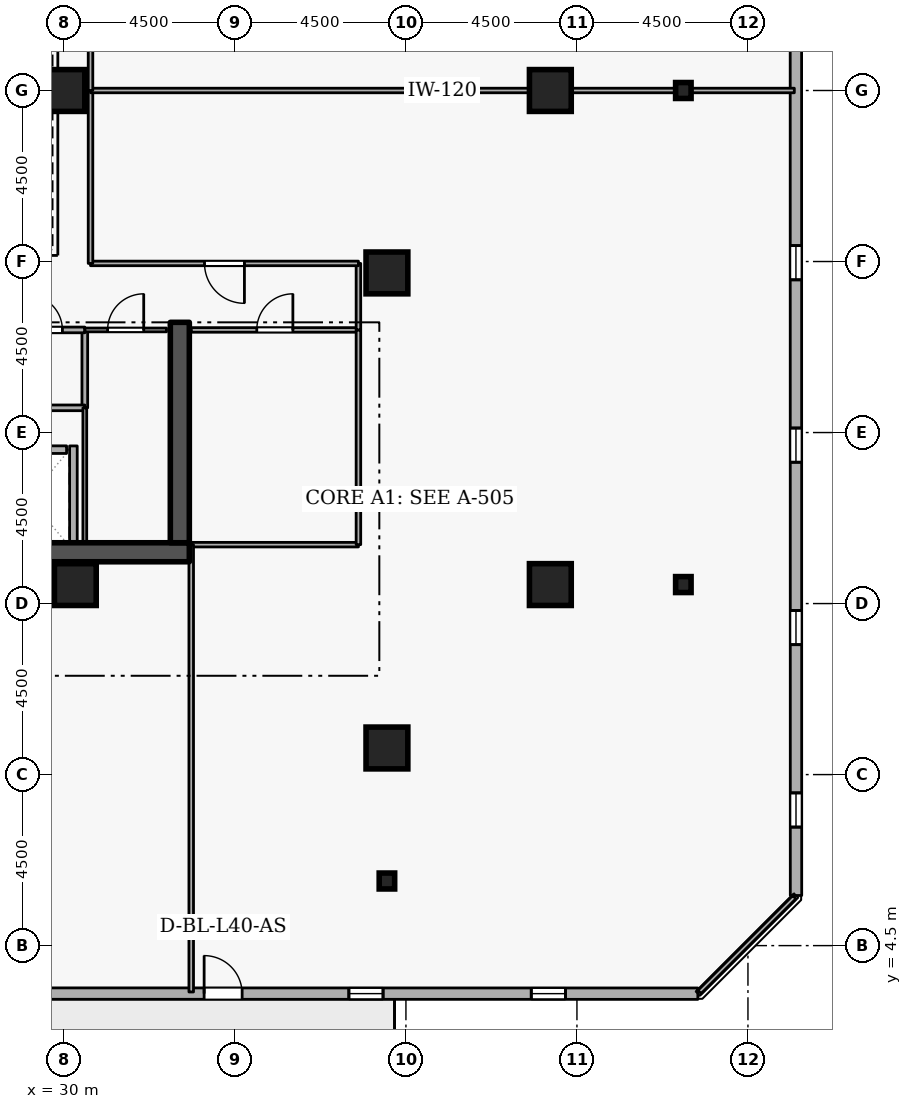
"""IFC4 building model, lengths in metres.
Left out: names, types, materials, properties, quantities, classifications, styles, units other than length and angle.
Written with IfcOpenShell. Run it as: python <this file> out.ifc"""

import sys

from ifc_helpers import new_model, si_unit, direction, frame, frame_2d, origin, origin_2d, place, context, subcontext, project, spatial, rectangle, i_section, extrude, element, fill, save


model = new_model("IFC4")
c1 = context("Model", 3, precision=1e-05, world=origin(), true_north=direction((0.0, 1.0)))
c2 = subcontext(c1, "Body", "Model", "MODEL_VIEW")
j1 = project(units=[si_unit("LENGTHUNIT", "METRE"), si_unit("PLANEANGLEUNIT", "RADIAN")], contexts=[c1])
p1 = place(None, origin())
s1 = spatial("IfcSite", under=j1, at=p1, CompositionType="ELEMENT")
p2 = place(p1, origin())
s2 = spatial("IfcBuilding", under=s1, at=p2, CompositionType="ELEMENT")
p3 = place(p2, frame((0.0, 0.0, 152.7)))
s3 = spatial("IfcBuildingStorey", under=s2, at=p3, CompositionType="ELEMENT", Elevation=152.7)
p4 = place(p3, frame((17.7, 14.85, 0.0), z_axis=(0.0, 0.0, 1.0), x_axis=(1.0, 0.0, 0.0)))
e1 = element("IfcWall", 1, at=p4, inside=s3, PredefinedType="SHEAR", context=c2, shape_type="SweptSolid", body=[
    extrude(rectangle(XDim=15.6, YDim=0.5, at=frame_2d((7.8, 0.0))), origin(), (0.0, 0.0, 1.0), 3.6),
])
p5 = place(p3, frame((33.05, 15.1, 0.0), z_axis=(0.0, 0.0, 1.0), x_axis=(0.0, 1.0, 0.0)))
e2 = element("IfcWall", 2, at=p5, inside=s3, PredefinedType="SHEAR", context=c2, shape_type="SweptSolid", body=[
    extrude(rectangle(XDim=5.8, YDim=0.5, at=frame_2d((2.9, 0.0))), origin(), (0.0, 0.0, 1.0), 3.6),
])
for number, where, z_axis, x_axis in (
    (3, (38.5, 9.7, 0.0), (0.0, 0.0, 1.0), (1.0, 0.0, 0.0)),
    (4, (42.8, 14.0, 0.0), (0.0, 0.0, 1.0), (1.0, 0.0, 0.0)),
    (5, (42.8, 27.0, 0.0), (0.0, 0.0, 1.0), (1.0, 0.0, 0.0)),
    (6, (38.5, 22.2, 0.0), (0.0, 0.0, 1.0), (1.0, 0.0, 0.0)),
    (7, (30.3, 14.0, 0.0), (0.0, 0.0, 1.0), (1.0, 0.0, 0.0)),
    (8, (30.0, 27.0, 0.0), (0.0, 0.0, 1.0), (1.0, 0.0, 0.0)),
):
    element("IfcColumn", number, at=place(p3, frame(where, z_axis=z_axis, x_axis=x_axis)), inside=s3, PredefinedType="COLUMN", context=c2, shape_type="SweptSolid", body=[
        extrude(rectangle(XDim=1.1, YDim=1.1, at=origin_2d()), origin(), (0.0, 0.0, 1.0), 3.6),
    ])
for number, where, z_axis, x_axis in (
    (9, (38.5, 6.2, 0.0), (0.0, 0.0, 1.0), (1.0, 0.0, 0.0)),
    (10, (46.3, 14.0, 0.0), (0.0, 0.0, 1.0), (1.0, 0.0, 0.0)),
    (11, (46.3, 27.0, 0.0), (0.0, 0.0, 1.0), (1.0, 0.0, 0.0)),
):
    element("IfcColumn", number, at=place(p3, frame(where, z_axis=z_axis, x_axis=x_axis)), inside=s3, PredefinedType="COLUMN", context=c2, shape_type="SweptSolid", body=[
        extrude(i_section(OverallWidth=0.407, OverallDepth=0.419, WebThickness=0.031, FlangeThickness=0.049, FilletRadius=0.015, at=origin_2d()), origin(), (0.0, 0.0, 1.0), 3.6),
    ])
p6 = place(p3, frame((11.698, 3.24, 0.0), z_axis=(0.0, 0.0, 1.0), x_axis=(0.999999991209, -0.000132597301, 0.0)))
e12 = element("IfcWall", 12, at=p6, inside=s3, PredefinedType="STANDARD", context=c2, shape_type="SweptSolid", body=[
    extrude(rectangle(XDim=34.983, YDim=0.3, at=frame_2d((17.492, 0.0))), origin(), (0.0, 0.0, 1.0), 2.7),
])
p7 = place(p6, frame((21.992, 0.0, 0.0)))
e13 = element("IfcOpeningElement", 13, at=p7, cuts=e12, PredefinedType="OPENING", context=c2, shape_type="SweptSolid", body=[
    extrude(rectangle(XDim=1.0, YDim=2.08, at=frame_2d((0.5, 1.04))), frame((0.0, 0.16, 0.0), z_axis=(0.0, -1.0, 0.0), x_axis=(1.0, 0.0, 0.0)), (0.0, 0.0, 1.0), 0.32),
])
p8 = place(p6, frame((1.8, 0.0, 0.72)))
e14 = element("IfcOpeningElement", 14, at=p8, cuts=e12, PredefinedType="OPENING", context=c2, shape_type="SweptSolid", body=[
    extrude(rectangle(XDim=0.9, YDim=1.75, at=frame_2d((0.45, 0.875))), frame((0.0, 0.16, 0.0), z_axis=(0.0, -1.0, 0.0), x_axis=(1.0, 0.0, 0.0)), (0.0, 0.0, 1.0), 0.32),
])
p9 = place(p6, frame((6.6, 0.0, 0.72)))
e15 = element("IfcOpeningElement", 15, at=p9, cuts=e12, PredefinedType="OPENING", context=c2, shape_type="SweptSolid", body=[
    extrude(rectangle(XDim=0.9, YDim=1.75, at=frame_2d((0.45, 0.875))), frame((0.0, 0.16, 0.0), z_axis=(0.0, -1.0, 0.0), x_axis=(1.0, 0.0, 0.0)), (0.0, 0.0, 1.0), 0.32),
])
p10 = place(p6, frame((11.4, 0.0, 0.72)))
e16 = element("IfcOpeningElement", 16, at=p10, cuts=e12, PredefinedType="OPENING", context=c2, shape_type="SweptSolid", body=[
    extrude(rectangle(XDim=0.9, YDim=1.75, at=frame_2d((0.45, 0.875))), frame((0.0, 0.16, 0.0), z_axis=(0.0, -1.0, 0.0), x_axis=(1.0, 0.0, 0.0)), (0.0, 0.0, 1.0), 0.32),
])
p11 = place(p6, frame((16.2, 0.0, 0.72)))
e17 = element("IfcOpeningElement", 17, at=p11, cuts=e12, PredefinedType="OPENING", context=c2, shape_type="SweptSolid", body=[
    extrude(rectangle(XDim=0.9, YDim=1.75, at=frame_2d((0.45, 0.875))), frame((0.0, 0.16, 0.0), z_axis=(0.0, -1.0, 0.0), x_axis=(1.0, 0.0, 0.0)), (0.0, 0.0, 1.0), 0.32),
])
p12 = place(p6, frame((25.8, 0.0, 0.72)))
e18 = element("IfcOpeningElement", 18, at=p12, cuts=e12, PredefinedType="OPENING", context=c2, shape_type="SweptSolid", body=[
    extrude(rectangle(XDim=0.9, YDim=1.75, at=frame_2d((0.45, 0.875))), frame((0.0, 0.16, 0.0), z_axis=(0.0, -1.0, 0.0), x_axis=(1.0, 0.0, 0.0)), (0.0, 0.0, 1.0), 0.32),
])
p13 = place(p6, frame((30.6, 0.0, 0.72)))
e19 = element("IfcOpeningElement", 19, at=p13, cuts=e12, PredefinedType="OPENING", context=c2, shape_type="SweptSolid", body=[
    extrude(rectangle(XDim=0.9, YDim=1.75, at=frame_2d((0.45, 0.875))), frame((0.0, 0.16, 0.0), z_axis=(0.0, -1.0, 0.0), x_axis=(1.0, 0.0, 0.0)), (0.0, 0.0, 1.0), 0.32),
])
p14 = place(p3, frame((49.265, 5.819, 0.0), z_axis=(0.0, 0.0, 1.0), x_axis=(-0.000132597301, 0.999999991209, 0.0)))
e20 = element("IfcWall", 20, at=p14, inside=s3, PredefinedType="STANDARD", context=c2, shape_type="SweptSolid", body=[
    extrude(rectangle(XDim=34.983, YDim=0.3, at=frame_2d((17.492, 0.0))), origin(), (0.0, 0.0, 1.0), 2.7),
])
p15 = place(p14, frame((1.8, 0.0, 0.72)))
e21 = element("IfcOpeningElement", 21, at=p15, cuts=e20, PredefinedType="OPENING", context=c2, shape_type="SweptSolid", body=[
    extrude(rectangle(XDim=0.9, YDim=1.75, at=frame_2d((0.45, 0.875))), frame((0.0, 0.16, 0.0), z_axis=(0.0, -1.0, 0.0), x_axis=(1.0, 0.0, 0.0)), (0.0, 0.0, 1.0), 0.32),
])
p16 = place(p14, frame((6.6, 0.0, 0.72)))
e22 = element("IfcOpeningElement", 22, at=p16, cuts=e20, PredefinedType="OPENING", context=c2, shape_type="SweptSolid", body=[
    extrude(rectangle(XDim=0.9, YDim=1.75, at=frame_2d((0.45, 0.875))), frame((0.0, 0.16, 0.0), z_axis=(0.0, -1.0, 0.0), x_axis=(1.0, 0.0, 0.0)), (0.0, 0.0, 1.0), 0.32),
])
p17 = place(p14, frame((11.4, 0.0, 0.72)))
e23 = element("IfcOpeningElement", 23, at=p17, cuts=e20, PredefinedType="OPENING", context=c2, shape_type="SweptSolid", body=[
    extrude(rectangle(XDim=0.9, YDim=1.75, at=frame_2d((0.45, 0.875))), frame((0.0, 0.16, 0.0), z_axis=(0.0, -1.0, 0.0), x_axis=(1.0, 0.0, 0.0)), (0.0, 0.0, 1.0), 0.32),
])
p18 = place(p14, frame((16.2, 0.0, 0.72)))
e24 = element("IfcOpeningElement", 24, at=p18, cuts=e20, PredefinedType="OPENING", context=c2, shape_type="SweptSolid", body=[
    extrude(rectangle(XDim=0.9, YDim=1.75, at=frame_2d((0.45, 0.875))), frame((0.0, 0.16, 0.0), z_axis=(0.0, -1.0, 0.0), x_axis=(1.0, 0.0, 0.0)), (0.0, 0.0, 1.0), 0.32),
])
p19 = place(p14, frame((25.8, 0.0, 0.72)))
e25 = element("IfcOpeningElement", 25, at=p19, cuts=e20, PredefinedType="OPENING", context=c2, shape_type="SweptSolid", body=[
    extrude(rectangle(XDim=0.9, YDim=1.75, at=frame_2d((0.45, 0.875))), frame((0.0, 0.16, 0.0), z_axis=(0.0, -1.0, 0.0), x_axis=(1.0, 0.0, 0.0)), (0.0, 0.0, 1.0), 0.32),
])
p20 = place(p14, frame((30.6, 0.0, 0.72)))
e26 = element("IfcOpeningElement", 26, at=p20, cuts=e20, PredefinedType="OPENING", context=c2, shape_type="SweptSolid", body=[
    extrude(rectangle(XDim=0.9, YDim=1.75, at=frame_2d((0.45, 0.875))), frame((0.0, 0.16, 0.0), z_axis=(0.0, -1.0, 0.0), x_axis=(1.0, 0.0, 0.0)), (0.0, 0.0, 1.0), 0.32),
])
p21 = place(p3, frame((28.08, 17.55, 0.0), z_axis=(0.0, 0.0, 1.0), x_axis=(1.0, 0.0, 0.0)))
e27 = element("IfcWall", 27, at=p21, inside=s3, PredefinedType="STANDARD", context=c2, shape_type="SweptSolid", body=[
    extrude(rectangle(XDim=1.99, YDim=0.2, at=frame_2d((0.995, 0.0))), origin(), (0.0, 0.0, 1.0), 3.34),
])
p22 = place(p3, frame((30.25, 15.112, 0.0), z_axis=(0.0, 0.0, 1.0), x_axis=(0.0, 1.0, 0.0)))
e28 = element("IfcWall", 28, at=p22, inside=s3, PredefinedType="STANDARD", context=c2, shape_type="SweptSolid", body=[
    extrude(rectangle(XDim=2.536, YDim=0.2, at=frame_2d((1.268, 0.0))), origin(), (0.0, 0.0, 1.0), 3.34),
])
p23 = place(p3, frame((30.55, 20.7, 0.0), z_axis=(0.0, 0.0, 1.0), x_axis=(0.0, -1.0, 0.0)))
e29 = element("IfcWall", 29, at=p23, inside=s3, PredefinedType="PARTITIONING", context=c2, shape_type="SweptSolid", body=[
    extrude(rectangle(XDim=2.05, YDim=0.15, at=frame_2d((1.025, 0.0))), origin(), (0.0, 0.0, 1.0), 3.34),
])
p24 = place(p3, frame((30.55, 18.65, 0.0), z_axis=(0.0, 0.0, 1.0), x_axis=(-1.0, 0.0, 0.0)))
e30 = element("IfcWall", 30, at=p24, inside=s3, PredefinedType="PARTITIONING", context=c2, shape_type="SweptSolid", body=[
    extrude(rectangle(XDim=2.1, YDim=0.15, at=frame_2d((1.05, 0.0))), origin(), (0.0, 0.0, 1.0), 3.34),
])
p25 = place(p3, frame((28.45, 20.7, 0.0), z_axis=(0.0, 0.0, 1.0), x_axis=(1.0, 0.0, 0.0)))
e31 = element("IfcWall", 31, at=p25, inside=s3, PredefinedType="PARTITIONING", context=c2, shape_type="SweptSolid", body=[
    extrude(rectangle(XDim=2.1, YDim=0.15, at=frame_2d((1.05, 0.0))), origin(), (0.0, 0.0, 1.0), 3.34),
])
p26 = place(p25, frame((0.59, 0.0, 0.0)))
e32 = element("IfcOpeningElement", 32, at=p26, cuts=e31, PredefinedType="OPENING", context=c2, shape_type="SweptSolid", body=[
    extrude(rectangle(XDim=0.92, YDim=2.08, at=frame_2d((0.46, 1.04))), frame((0.0, 0.085, 0.0), z_axis=(0.0, -1.0, 0.0), x_axis=(1.0, 0.0, 0.0)), (0.0, 0.0, 1.0), 0.17),
])
p27 = place(p3, frame((30.55, 15.1, 0.0), z_axis=(0.0, 0.0, 1.0), x_axis=(0.0, 1.0, 0.0)))
e33 = element("IfcWall", 33, at=p27, inside=s3, PredefinedType="PARTITIONING", context=c2, shape_type="SweptSolid", body=[
    extrude(rectangle(XDim=3.55, YDim=0.1, at=frame_2d((1.775, 0.0))), origin(), (0.0, 0.0, 1.0), 3.34),
])
p28 = place(p3, frame((30.55, 20.7, 0.0), z_axis=(0.0, 0.0, 1.0), x_axis=(1.0, 0.0, 0.0)))
e34 = element("IfcWall", 34, at=p28, inside=s3, PredefinedType="PARTITIONING", context=c2, shape_type="SweptSolid", body=[
    extrude(rectangle(XDim=2.15, YDim=0.1, at=frame_2d((1.075, 0.0))), origin(), (0.0, 0.0, 1.0), 3.34),
])
p29 = place(p28, frame((0.6, 0.0, 0.0)))
e35 = element("IfcOpeningElement", 35, at=p29, cuts=e34, PredefinedType="OPENING", context=c2, shape_type="SweptSolid", body=[
    extrude(rectangle(XDim=0.95, YDim=2.1, at=frame_2d((0.475, 1.05))), frame((0.0, 0.06, 0.0), z_axis=(0.0, -1.0, 0.0), x_axis=(1.0, 0.0, 0.0)), (0.0, 0.0, 1.0), 0.12),
])
p30 = place(p3, frame((37.75, 15.05, 0.0), z_axis=(0.0, 0.0, 1.0), x_axis=(-1.0, 0.0, 0.0)))
e36 = element("IfcWall", 36, at=p30, inside=s3, PredefinedType="PARTITIONING", context=c2, shape_type="SweptSolid", body=[
    extrude(rectangle(XDim=4.4, YDim=0.12, at=frame_2d((2.2, 0.0))), origin(), (0.0, 0.0, 1.0), 3.34),
])
p31 = place(p3, frame((33.35, 20.7, 0.0), z_axis=(0.0, 0.0, 1.0), x_axis=(1.0, 0.0, 0.0)))
e37 = element("IfcWall", 37, at=p31, inside=s3, PredefinedType="PARTITIONING", context=c2, shape_type="SweptSolid", body=[
    extrude(rectangle(XDim=4.4, YDim=0.12, at=frame_2d((2.2, 0.0))), origin(), (0.0, 0.0, 1.0), 3.34),
])
p32 = place(p31, frame((1.725, 0.0, 0.0)))
e38 = element("IfcOpeningElement", 38, at=p32, cuts=e37, PredefinedType="OPENING", context=c2, shape_type="SweptSolid", body=[
    extrude(rectangle(XDim=0.95, YDim=2.1, at=frame_2d((0.475, 1.05))), frame((0.0, 0.07, 0.0), z_axis=(0.0, -1.0, 0.0), x_axis=(1.0, 0.0, 0.0)), (0.0, 0.0, 1.0), 0.14),
])
p33 = place(p3, frame((37.75, 20.7, 0.0), z_axis=(0.0, 0.0, 1.0), x_axis=(0.0, -1.0, 0.0)))
e39 = element("IfcWall", 39, at=p33, inside=s3, PredefinedType="PARTITIONING", context=c2, shape_type="SweptSolid", body=[
    extrude(rectangle(XDim=5.65, YDim=0.12, at=frame_2d((2.825, 0.0))), origin(), (0.0, 0.0, 1.0), 3.34),
])
p34 = place(p3, frame((33.35, 3.28, 0.0), z_axis=(0.0, 0.0, 1.0), x_axis=(0.0, 1.0, 0.0)))
e40 = element("IfcWall", 40, at=p34, inside=s3, PredefinedType="PARTITIONING", context=c2, shape_type="SweptSolid", body=[
    extrude(rectangle(XDim=11.77, YDim=0.12, at=frame_2d((5.885, 0.0))), origin(), (0.0, 0.0, 1.0), 2.545),
])
p35 = place(p3, frame((37.75, 20.7, 0.0), z_axis=(0.0, 0.0, 1.0), x_axis=(0.0, 1.0, 0.0)))
e41 = element("IfcWall", 41, at=p35, inside=s3, PredefinedType="PARTITIONING", context=c2, shape_type="SweptSolid", body=[
    extrude(rectangle(XDim=1.75, YDim=0.12, at=frame_2d((0.875, 0.0))), origin(), (0.0, 0.0, 1.0), 3.34),
])
p36 = place(p3, frame((37.75, 22.45, 0.0), z_axis=(0.0, 0.0, 1.0), x_axis=(-1.0, 0.0, 0.0)))
e42 = element("IfcWall", 42, at=p36, inside=s3, PredefinedType="PARTITIONING", context=c2, shape_type="SweptSolid", body=[
    extrude(rectangle(XDim=7.05, YDim=0.12, at=frame_2d((3.525, 0.0))), origin(), (0.0, 0.0, 1.0), 3.34),
])
p37 = place(p36, frame((3.0, 0.0, 0.0)))
e43 = element("IfcOpeningElement", 43, at=p37, cuts=e42, PredefinedType="OPENING", context=c2, shape_type="SweptSolid", body=[
    extrude(rectangle(XDim=1.05, YDim=2.1, at=frame_2d((0.525, 1.05))), frame((0.0, 0.07, 0.0), z_axis=(0.0, -1.0, 0.0), x_axis=(1.0, 0.0, 0.0)), (0.0, 0.0, 1.0), 0.14),
])
p38 = place(p3, frame((30.7, 22.45, 0.0), z_axis=(0.0, 0.0, 1.0), x_axis=(0.0, 1.0, 0.0)))
e44 = element("IfcWall", 44, at=p38, inside=s3, PredefinedType="PARTITIONING", context=c2, shape_type="SweptSolid", body=[
    extrude(rectangle(XDim=4.55, YDim=0.12, at=frame_2d((2.275, 0.0))), origin(), (0.0, 0.0, 1.0), 3.34),
])
p39 = place(p3, frame((30.7, 27.0, 0.0), z_axis=(0.0, 0.0, 1.0), x_axis=(1.0, 0.0, 0.0)))
e45 = element("IfcWall", 45, at=p39, inside=s3, PredefinedType="PARTITIONING", context=c2, shape_type="SweptSolid", body=[
    extrude(rectangle(XDim=18.52, YDim=0.12, at=frame_2d((9.26, 0.0))), origin(), (0.0, 0.0, 1.0), 2.932),
])
p40 = place(p3, frame((49.22, 5.775, 0.0), z_axis=(0.0, 0.0, 1.0), x_axis=(-0.707106781187, -0.707106781187, 0.0)))
e46 = element("IfcWall", 46, at=p40, inside=s3, PredefinedType="PARTITIONING", context=c2, shape_type="SweptSolid", body=[
    extrude(rectangle(XDim=3.528, YDim=0.12, at=frame_2d((1.764, 0.0))), origin(), (0.0, 0.0, 1.0), 3.34),
])
p41 = place(p3, frame((30.7, 27.0, 0.0), z_axis=(0.0, 0.0, 1.0), x_axis=(0.0, 1.0, 0.0)))
e47 = element("IfcWall", 47, at=p41, inside=s3, PredefinedType="PARTITIONING", context=c2, shape_type="SweptSolid", body=[
    extrude(rectangle(XDim=4.55, YDim=0.12, at=frame_2d((2.275, 0.0))), origin(), (0.0, 0.0, 1.0), 3.34),
])
p42 = place(p7, origin())
e48 = element("IfcDoor", 48, at=p42, inside=s3, OperationType="SINGLE_SWING_LEFT", PredefinedType="DOOR", context=c2, shape_type="SweptSolid", body=[
    extrude(rectangle(XDim=1.0, YDim=2.08, at=frame_2d((0.5, 1.04))), frame((0.0, 0.025, 0.0), z_axis=(0.0, -1.0, 0.0), x_axis=(1.0, 0.0, 0.0)), (0.0, 0.0, 1.0), 0.05),
])
fill(e13, e48)
p43 = place(p12, origin())
e49 = element("IfcWindow", 49, at=p43, inside=s3, PartitioningType="SINGLE_PANEL", PredefinedType="WINDOW", context=c2, shape_type="SweptSolid", body=[
    extrude(rectangle(XDim=0.9, YDim=1.75, at=frame_2d((0.45, 0.875))), frame((0.0, 0.03, 0.0), z_axis=(0.0, -1.0, 0.0), x_axis=(1.0, 0.0, 0.0)), (0.0, 0.0, 1.0), 0.06),
])
fill(e18, e49)
p44 = place(p13, origin())
e50 = element("IfcWindow", 50, at=p44, inside=s3, PartitioningType="SINGLE_PANEL", PredefinedType="WINDOW", context=c2, shape_type="SweptSolid", body=[
    extrude(rectangle(XDim=0.9, YDim=1.75, at=frame_2d((0.45, 0.875))), frame((0.0, 0.03, 0.0), z_axis=(0.0, -1.0, 0.0), x_axis=(1.0, 0.0, 0.0)), (0.0, 0.0, 1.0), 0.06),
])
fill(e19, e50)
p45 = place(p15, origin())
e51 = element("IfcWindow", 51, at=p45, inside=s3, PartitioningType="SINGLE_PANEL", PredefinedType="WINDOW", context=c2, shape_type="SweptSolid", body=[
    extrude(rectangle(XDim=0.9, YDim=1.75, at=frame_2d((0.45, 0.875))), frame((0.0, 0.03, 0.0), z_axis=(0.0, -1.0, 0.0), x_axis=(1.0, 0.0, 0.0)), (0.0, 0.0, 1.0), 0.06),
])
fill(e21, e51)
p46 = place(p16, origin())
e52 = element("IfcWindow", 52, at=p46, inside=s3, PartitioningType="SINGLE_PANEL", PredefinedType="WINDOW", context=c2, shape_type="SweptSolid", body=[
    extrude(rectangle(XDim=0.9, YDim=1.75, at=frame_2d((0.45, 0.875))), frame((0.0, 0.03, 0.0), z_axis=(0.0, -1.0, 0.0), x_axis=(1.0, 0.0, 0.0)), (0.0, 0.0, 1.0), 0.06),
])
fill(e22, e52)
p47 = place(p17, origin())
e53 = element("IfcWindow", 53, at=p47, inside=s3, PartitioningType="SINGLE_PANEL", PredefinedType="WINDOW", context=c2, shape_type="SweptSolid", body=[
    extrude(rectangle(XDim=0.9, YDim=1.75, at=frame_2d((0.45, 0.875))), frame((0.0, 0.03, 0.0), z_axis=(0.0, -1.0, 0.0), x_axis=(1.0, 0.0, 0.0)), (0.0, 0.0, 1.0), 0.06),
])
fill(e23, e53)
p48 = place(p18, origin())
e54 = element("IfcWindow", 54, at=p48, inside=s3, PartitioningType="SINGLE_PANEL", PredefinedType="WINDOW", context=c2, shape_type="SweptSolid", body=[
    extrude(rectangle(XDim=0.9, YDim=1.75, at=frame_2d((0.45, 0.875))), frame((0.0, 0.03, 0.0), z_axis=(0.0, -1.0, 0.0), x_axis=(1.0, 0.0, 0.0)), (0.0, 0.0, 1.0), 0.06),
])
fill(e24, e54)
p49 = place(p26, origin())
e55 = element("IfcDoor", 55, at=p49, inside=s3, OperationType="SINGLE_SWING_LEFT", PredefinedType="DOOR", context=c2, shape_type="SweptSolid", body=[
    extrude(rectangle(XDim=0.92, YDim=2.08, at=frame_2d((0.46, 1.04))), frame((0.0, 0.025, 0.0), z_axis=(0.0, -1.0, 0.0), x_axis=(1.0, 0.0, 0.0)), (0.0, 0.0, 1.0), 0.05),
])
fill(e32, e55)
p50 = place(p29, origin())
e56 = element("IfcDoor", 56, at=p50, inside=s3, OperationType="SINGLE_SWING_RIGHT", PredefinedType="DOOR", context=c2, shape_type="SweptSolid", body=[
    extrude(rectangle(XDim=0.95, YDim=2.1, at=frame_2d((0.475, 1.05))), frame((0.0, 0.025, 0.0), z_axis=(0.0, -1.0, 0.0), x_axis=(1.0, 0.0, 0.0)), (0.0, 0.0, 1.0), 0.05),
])
fill(e35, e56)
p51 = place(p32, origin())
e57 = element("IfcDoor", 57, at=p51, inside=s3, OperationType="SINGLE_SWING_RIGHT", PredefinedType="DOOR", context=c2, shape_type="SweptSolid", body=[
    extrude(rectangle(XDim=0.95, YDim=2.1, at=frame_2d((0.475, 1.05))), frame((0.0, 0.025, 0.0), z_axis=(0.0, -1.0, 0.0), x_axis=(1.0, 0.0, 0.0)), (0.0, 0.0, 1.0), 0.05),
])
fill(e38, e57)
p52 = place(p37, origin())
e58 = element("IfcDoor", 58, at=p52, inside=s3, OperationType="SINGLE_SWING_LEFT", PredefinedType="DOOR", context=c2, shape_type="SweptSolid", body=[
    extrude(rectangle(XDim=1.05, YDim=2.1, at=frame_2d((0.525, 1.05))), frame((0.0, 0.025, 0.0), z_axis=(0.0, -1.0, 0.0), x_axis=(1.0, 0.0, 0.0)), (0.0, 0.0, 1.0), 0.05),
])
fill(e43, e58)
save(model, sys.argv[1])
